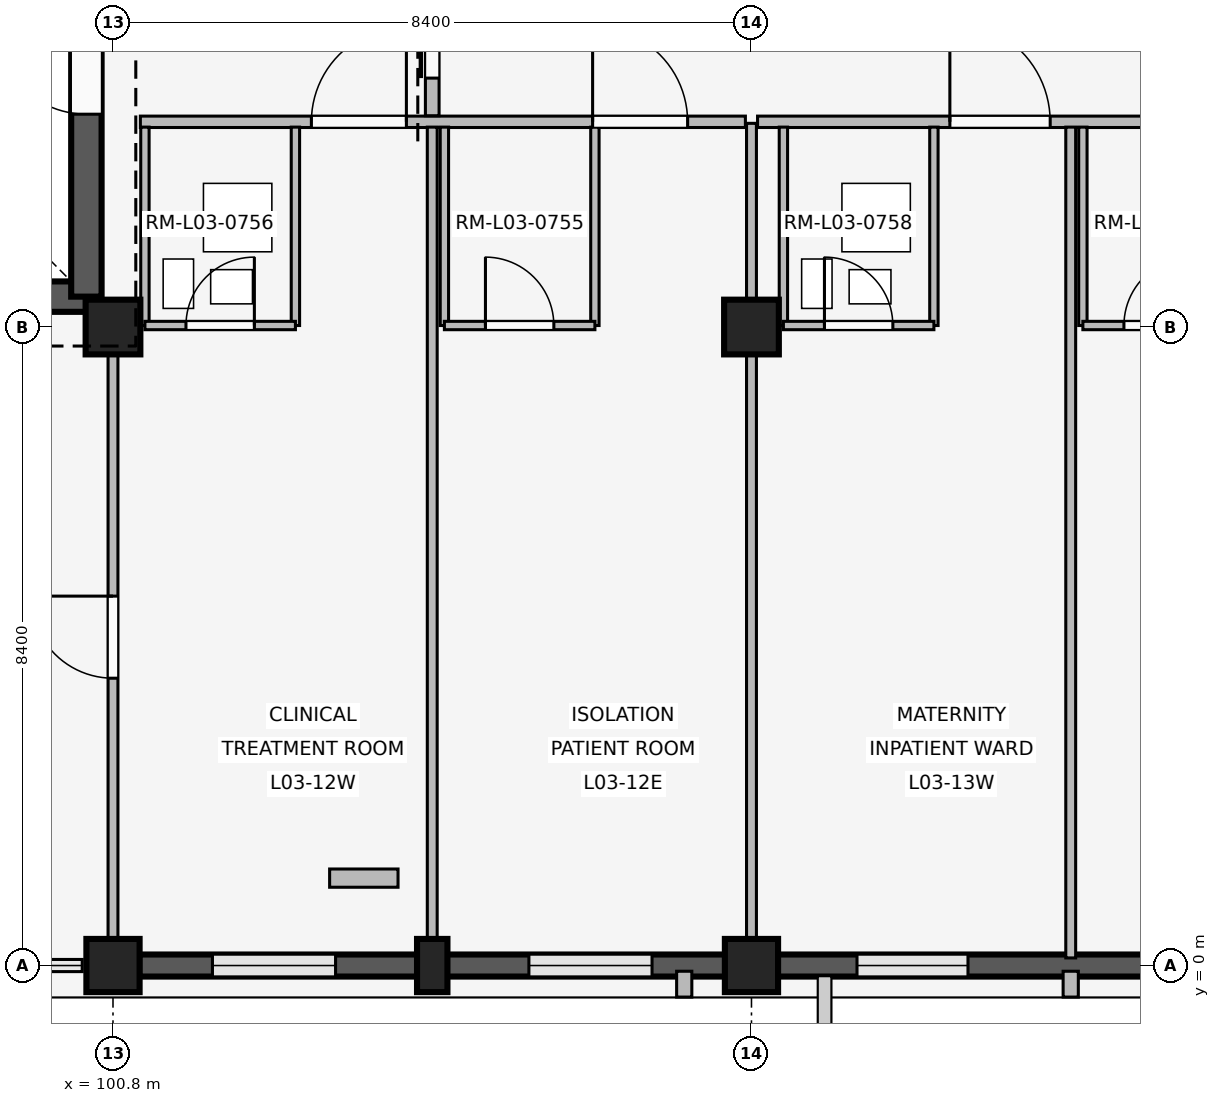
"""IFC4 building model, lengths in metres.
Left out: names, types, materials, properties, quantities, classifications, styles, units other than length and angle.
Written with IfcOpenShell. Run it as: python <this file> out.ifc"""

import sys

from ifc_helpers import new_model, si_unit, direction, frame, frame_2d, origin, origin_2d, place, context, subcontext, project, spatial, rectangle, extrude, element, fill, save


model = new_model("IFC4")
c1 = context("Model", 3, precision=1e-05, world=origin(), true_north=direction((0.0, 1.0)))
c2 = subcontext(c1, "Body", "Model", "MODEL_VIEW")
j1 = project(units=[si_unit("LENGTHUNIT", "METRE"), si_unit("PLANEANGLEUNIT", "RADIAN")], contexts=[c1])
p1 = place(None, origin())
s1 = spatial("IfcSite", under=j1, at=p1, CompositionType="ELEMENT")
p2 = place(p1, origin())
s2 = spatial("IfcBuilding", under=s1, at=p2, CompositionType="ELEMENT")
p3 = place(p2, frame((0.0, 0.0, 12.9)))
s3 = spatial("IfcBuildingStorey", under=s2, at=p3, CompositionType="ELEMENT", Elevation=12.9)
p4 = place(p3, frame((100.8, 0.0, 0.0), z_axis=(0.0, 0.0, 1.0), x_axis=(1.0, 0.0, 0.0)))
e1 = element("IfcColumn", 1, at=p4, inside=s3, PredefinedType="COLUMN", context=c2, shape_type="SweptSolid", body=[
    extrude(rectangle(XDim=0.7, YDim=0.7, at=origin_2d()), origin(), (0.0, 0.0, 1.0), 3.3),
])
p5 = place(p3, frame((100.8, 8.4, 0.0), z_axis=(0.0, 0.0, 1.0), x_axis=(1.0, 0.0, 0.0)))
e2 = element("IfcColumn", 2, at=p5, inside=s3, PredefinedType="COLUMN", context=c2, shape_type="SweptSolid", body=[
    extrude(rectangle(XDim=0.72, YDim=0.72, at=origin_2d()), origin(), (0.0, 0.0, 1.0), 3.3),
])
p6 = place(p3, frame((109.2, 0.0, 0.0), z_axis=(0.0, 0.0, 1.0), x_axis=(1.0, 0.0, 0.0)))
e3 = element("IfcColumn", 3, at=p6, inside=s3, PredefinedType="COLUMN", context=c2, shape_type="SweptSolid", body=[
    extrude(rectangle(XDim=0.7, YDim=0.7, at=origin_2d()), origin(), (0.0, 0.0, 1.0), 3.3),
])
p7 = place(p3, frame((109.2, 8.4, 0.0), z_axis=(0.0, 0.0, 1.0), x_axis=(1.0, 0.0, 0.0)))
e4 = element("IfcColumn", 4, at=p7, inside=s3, PredefinedType="COLUMN", context=c2, shape_type="SweptSolid", body=[
    extrude(rectangle(XDim=0.72, YDim=0.72, at=origin_2d()), origin(), (0.0, 0.0, 1.0), 3.3),
])
p8 = place(p3, frame((105.0, 0.0, 0.0), z_axis=(0.0, 0.0, 1.0), x_axis=(1.0, 0.0, 0.0)))
e5 = element("IfcColumn", 5, at=p8, inside=s3, PredefinedType="PILASTER", context=c2, shape_type="SweptSolid", body=[
    extrude(rectangle(XDim=0.4, YDim=0.7, at=origin_2d()), origin(), (0.0, 0.0, 1.0), 3.3),
])
p9 = place(p3, frame((108.855, 0.0, 0.0), z_axis=(0.0, 0.0, 1.0), x_axis=(-1.0, 0.0, 0.0)))
e6 = element("IfcWall", 6, at=p9, inside=s3, PredefinedType="SOLIDWALL", context=c2, shape_type="SweptSolid", body=[
    extrude(rectangle(XDim=7.71, YDim=0.29, at=frame_2d((3.855, 0.0))), origin(), (0.0, 0.0, 1.0), 2.44),
])
p10 = place(p9, frame((0.963, 0.0, 0.85)))
e7 = element("IfcOpeningElement", 7, at=p10, cuts=e6, PredefinedType="OPENING", context=c2, shape_type="SweptSolid", body=[
    extrude(rectangle(XDim=1.62, YDim=0.95, at=frame_2d((0.81, 0.475))), frame((0.0, 0.155, 0.0), z_axis=(0.0, -1.0, 0.0), x_axis=(1.0, 0.0, 0.0)), (0.0, 0.0, 1.0), 0.31),
])
p11 = place(p9, frame((5.127, 0.0, 0.85)))
e8 = element("IfcOpeningElement", 8, at=p11, cuts=e6, PredefinedType="OPENING", context=c2, shape_type="SweptSolid", body=[
    extrude(rectangle(XDim=1.62, YDim=0.95, at=frame_2d((0.81, 0.475))), frame((0.0, 0.155, 0.0), z_axis=(0.0, -1.0, 0.0), x_axis=(1.0, 0.0, 0.0)), (0.0, 0.0, 1.0), 0.31),
])
p12 = place(p3, frame((108.315, -0.075, 0.0), z_axis=(0.0, 0.0, 1.0), x_axis=(0.0, -1.0, 0.0)))
e9 = element("IfcWall", 9, at=p12, inside=s3, PredefinedType="ELEMENTEDWALL", context=c2, shape_type="SweptSolid", body=[
    extrude(rectangle(XDim=0.34, YDim=0.2, at=frame_2d((0.17, 0.0))), origin(), (0.0, 0.0, 1.0), 2.42),
])
p13 = place(p3, frame((117.255, 0.0, 0.0), z_axis=(0.0, 0.0, 1.0), x_axis=(-1.0, 0.0, 0.0)))
e10 = element("IfcWall", 10, at=p13, inside=s3, PredefinedType="SOLIDWALL", context=c2, shape_type="SweptSolid", body=[
    extrude(rectangle(XDim=7.71, YDim=0.29, at=frame_2d((3.855, 0.0))), origin(), (0.0, 0.0, 1.0), 2.44),
])
p14 = place(p13, frame((1.043, 0.0, 0.85)))
e11 = element("IfcOpeningElement", 11, at=p14, cuts=e10, PredefinedType="OPENING", context=c2, shape_type="SweptSolid", body=[
    extrude(rectangle(XDim=1.46, YDim=0.85, at=frame_2d((0.73, 0.425))), frame((0.0, 0.155, 0.0), z_axis=(0.0, -1.0, 0.0), x_axis=(1.0, 0.0, 0.0)), (0.0, 0.0, 1.0), 0.31),
])
p15 = place(p13, frame((5.207, 0.0, 0.85)))
e12 = element("IfcOpeningElement", 12, at=p15, cuts=e10, PredefinedType="OPENING", context=c2, shape_type="SweptSolid", body=[
    extrude(rectangle(XDim=1.46, YDim=0.85, at=frame_2d((0.73, 0.425))), frame((0.0, 0.155, 0.0), z_axis=(0.0, -1.0, 0.0), x_axis=(1.0, 0.0, 0.0)), (0.0, 0.0, 1.0), 0.31),
])
p16 = place(p3, frame((113.4, -0.075, 0.0), z_axis=(0.0, 0.0, 1.0), x_axis=(0.0, -1.0, 0.0)))
e13 = element("IfcWall", 13, at=p16, inside=s3, PredefinedType="ELEMENTEDWALL", context=c2, shape_type="SweptSolid", body=[
    extrude(rectangle(XDim=0.34, YDim=0.2, at=frame_2d((0.17, 0.0))), origin(), (0.0, 0.0, 1.0), 2.42),
])
p17 = place(p3, frame((92.95, 8.8, 0.0), z_axis=(0.0, 0.0, 1.0), x_axis=(1.0, 0.0, 0.0)))
e14 = element("IfcWall", 14, at=p17, inside=s3, PredefinedType="SHEAR", context=c2, shape_type="SweptSolid", body=[
    extrude(rectangle(XDim=7.5, YDim=0.4, at=frame_2d((3.75, 0.0))), origin(), (0.0, 0.0, 1.0), 3.02),
])
p18 = place(p17, frame((4.85, 0.0, 0.0)))
e15 = element("IfcOpeningElement", 15, at=p18, cuts=e14, PredefinedType="OPENING", context=c2, shape_type="SweptSolid", body=[
    extrude(rectangle(XDim=1.2, YDim=2.2, at=frame_2d((0.6, 1.1))), frame((0.0, 0.21, 0.0), z_axis=(0.0, -1.0, 0.0), x_axis=(1.0, 0.0, 0.0)), (0.0, 0.0, 1.0), 0.42),
])
p19 = place(p3, frame((100.45, 8.8, 0.0), z_axis=(0.0, 0.0, 1.0), x_axis=(0.0, 1.0, 0.0)))
e16 = element("IfcWall", 16, at=p19, inside=s3, PredefinedType="SHEAR", context=c2, shape_type="SweptSolid", body=[
    extrude(rectangle(XDim=7.55, YDim=0.4, at=frame_2d((3.775, 0.0))), origin(), (0.0, 0.0, 1.0), 3.02),
])
p20 = place(p19, frame((2.4, 0.0, 0.0)))
e17 = element("IfcOpeningElement", 17, at=p20, cuts=e16, PredefinedType="OPENING", context=c2, shape_type="SweptSolid", body=[
    extrude(rectangle(XDim=1.2, YDim=2.2, at=frame_2d((0.6, 1.1))), frame((0.0, 0.21, 0.0), z_axis=(0.0, -1.0, 0.0), x_axis=(1.0, 0.0, 0.0)), (0.0, 0.0, 1.0), 0.42),
])
p21 = place(p3, frame((100.8, 0.14, 0.0), z_axis=(0.0, 0.0, 1.0), x_axis=(0.0, 1.0, 0.0)))
e18 = element("IfcWall", 18, at=p21, inside=s3, PredefinedType="PARTITIONING", context=c2, shape_type="SweptSolid", body=[
    extrude(rectangle(XDim=8.21, YDim=0.13, at=frame_2d((4.105, 0.0))), origin(), (0.0, 0.0, 1.0), 2.42),
])
p22 = place(p21, frame((3.64, 0.0, 0.0)))
e19 = element("IfcOpeningElement", 19, at=p22, cuts=e18, PredefinedType="OPENING", context=c2, shape_type="SweptSolid", body=[
    extrude(rectangle(XDim=1.08, YDim=2.15, at=frame_2d((0.54, 1.075))), frame((0.0, 0.075, 0.0), z_axis=(0.0, -1.0, 0.0), x_axis=(1.0, 0.0, 0.0)), (0.0, 0.0, 1.0), 0.15),
])
p23 = place(p3, frame((101.16, 11.1, 0.0), z_axis=(0.0, 0.0, 1.0), x_axis=(1.0, 0.0, 0.0)))
e20 = element("IfcWall", 20, at=p23, inside=s3, PredefinedType="PARTITIONING", context=c2, shape_type="SweptSolid", body=[
    extrude(rectangle(XDim=7.96, YDim=0.15, at=frame_2d((3.98, 0.0))), origin(), (0.0, 0.0, 1.0), 2.42),
])
p24 = place(p23, frame((2.25, 0.0, 0.0)))
e21 = element("IfcOpeningElement", 21, at=p24, cuts=e20, PredefinedType="OPENING", context=c2, shape_type="SweptSolid", body=[
    extrude(rectangle(XDim=1.25, YDim=2.2, at=frame_2d((0.625, 1.1))), frame((0.0, 0.085, 0.0), z_axis=(0.0, -1.0, 0.0), x_axis=(1.0, 0.0, 0.0)), (0.0, 0.0, 1.0), 0.17),
])
p25 = place(p23, frame((5.95, 0.0, 0.0)))
e22 = element("IfcOpeningElement", 22, at=p25, cuts=e20, PredefinedType="OPENING", context=c2, shape_type="SweptSolid", body=[
    extrude(rectangle(XDim=1.25, YDim=2.2, at=frame_2d((0.625, 1.1))), frame((0.0, 0.085, 0.0), z_axis=(0.0, -1.0, 0.0), x_axis=(1.0, 0.0, 0.0)), (0.0, 0.0, 1.0), 0.17),
])
p26 = place(p3, frame((105.0, 0.1, 0.0), z_axis=(0.0, 0.0, 1.0), x_axis=(0.0, 1.0, 0.0)))
e23 = element("IfcWall", 23, at=p26, inside=s3, PredefinedType="PARTITIONING", context=c2, shape_type="SweptSolid", body=[
    extrude(rectangle(XDim=10.93, YDim=0.13, at=frame_2d((5.465, 0.0))), origin(), (0.0, 0.0, 1.0), 2.42),
])
for number, where, z_axis, x_axis in (
    (24, (101.22, 8.42, 0.0), (0.0, 0.0, 1.0), (0.0, 1.0, 0.0)),
    (25, (103.2, 8.42, 0.0), (0.0, 0.0, 1.0), (0.0, 1.0, 0.0)),
):
    element("IfcWall", number, at=place(p3, frame(where, z_axis=z_axis, x_axis=x_axis)), inside=s3, PredefinedType="PARTITIONING", context=c2, shape_type="SweptSolid", body=[
        extrude(rectangle(XDim=2.61, YDim=0.11, at=frame_2d((1.305, 0.0))), origin(), (0.0, 0.0, 1.0), 2.42),
    ])
p27 = place(p3, frame((101.22, 8.42, 0.0), z_axis=(0.0, 0.0, 1.0), x_axis=(1.0, 0.0, 0.0)))
e26 = element("IfcWall", 26, at=p27, inside=s3, PredefinedType="PARTITIONING", context=c2, shape_type="SweptSolid", body=[
    extrude(rectangle(XDim=1.98, YDim=0.11, at=frame_2d((0.99, 0.0))), origin(), (0.0, 0.0, 1.0), 2.42),
])
p28 = place(p27, frame((0.54, 0.0, 0.0)))
e27 = element("IfcOpeningElement", 27, at=p28, cuts=e26, PredefinedType="OPENING", context=c2, shape_type="SweptSolid", body=[
    extrude(rectangle(XDim=0.9, YDim=2.1, at=frame_2d((0.45, 1.05))), frame((0.0, 0.065, 0.0), z_axis=(0.0, -1.0, 0.0), x_axis=(1.0, 0.0, 0.0)), (0.0, 0.0, 1.0), 0.13),
])
for number, where, z_axis, x_axis in (
    (28, (105.16, 8.42, 0.0), (0.0, 0.0, 1.0), (0.0, 1.0, 0.0)),
    (29, (107.14, 8.42, 0.0), (0.0, 0.0, 1.0), (0.0, 1.0, 0.0)),
):
    element("IfcWall", number, at=place(p3, frame(where, z_axis=z_axis, x_axis=x_axis)), inside=s3, PredefinedType="PARTITIONING", context=c2, shape_type="SweptSolid", body=[
        extrude(rectangle(XDim=2.61, YDim=0.11, at=frame_2d((1.305, 0.0))), origin(), (0.0, 0.0, 1.0), 2.42),
    ])
p29 = place(p3, frame((105.16, 8.42, 0.0), z_axis=(0.0, 0.0, 1.0), x_axis=(1.0, 0.0, 0.0)))
e30 = element("IfcWall", 30, at=p29, inside=s3, PredefinedType="PARTITIONING", context=c2, shape_type="SweptSolid", body=[
    extrude(rectangle(XDim=1.98, YDim=0.11, at=frame_2d((0.99, 0.0))), origin(), (0.0, 0.0, 1.0), 2.42),
])
p30 = place(p29, frame((0.54, 0.0, 0.0)))
e31 = element("IfcOpeningElement", 31, at=p30, cuts=e30, PredefinedType="OPENING", context=c2, shape_type="SweptSolid", body=[
    extrude(rectangle(XDim=0.9, YDim=2.1, at=frame_2d((0.45, 1.05))), frame((0.0, 0.065, 0.0), z_axis=(0.0, -1.0, 0.0), x_axis=(1.0, 0.0, 0.0)), (0.0, 0.0, 1.0), 0.13),
])
p31 = place(p3, frame((103.65, 1.15, 0.0), z_axis=(0.0, 0.0, 1.0), x_axis=(1.0, 0.0, 0.0)))
e32 = element("IfcWall", 32, at=p31, inside=s3, PredefinedType="PLUMBINGWALL", context=c2, shape_type="SweptSolid", body=[
    extrude(rectangle(XDim=0.9, YDim=0.24, at=frame_2d((0.45, 0.0))), origin(), (0.0, 0.0, 1.0), 2.42),
])
p32 = place(p3, frame((105.0, 11.18, 0.0), z_axis=(0.0, 0.0, 1.0), x_axis=(0.0, 1.0, 0.0)))
e33 = element("IfcWall", 33, at=p32, inside=s3, PredefinedType="PARTITIONING", context=c2, shape_type="SweptSolid", body=[
    extrude(rectangle(XDim=2.84, YDim=0.18, at=frame_2d((1.42, 0.0))), origin(), (0.0, 0.0, 1.0), 2.42),
])
p33 = place(p32, frame((0.495, 0.0, 0.0)))
e34 = element("IfcOpeningElement", 34, at=p33, cuts=e33, PredefinedType="OPENING", context=c2, shape_type="SweptSolid", body=[
    extrude(rectangle(XDim=1.85, YDim=2.3, at=frame_2d((0.925, 1.15))), frame((0.0, 0.1, 0.0), z_axis=(0.0, -1.0, 0.0), x_axis=(1.0, 0.0, 0.0)), (0.0, 0.0, 1.0), 0.2),
])
p34 = place(p3, frame((109.2, 0.14, 0.0), z_axis=(0.0, 0.0, 1.0), x_axis=(0.0, 1.0, 0.0)))
e35 = element("IfcWall", 35, at=p34, inside=s3, PredefinedType="PARTITIONING", context=c2, shape_type="SweptSolid", body=[
    extrude(rectangle(XDim=10.94, YDim=0.13, at=frame_2d((5.47, 0.0))), origin(), (0.0, 0.0, 1.0), 2.42),
])
p35 = place(p3, frame((109.28, 11.1, 0.0), z_axis=(0.0, 0.0, 1.0), x_axis=(1.0, 0.0, 0.0)))
e36 = element("IfcWall", 36, at=p35, inside=s3, PredefinedType="PARTITIONING", context=c2, shape_type="SweptSolid", body=[
    extrude(rectangle(XDim=8.24, YDim=0.15, at=frame_2d((4.12, 0.0))), origin(), (0.0, 0.0, 1.0), 2.42),
])
p36 = place(p35, frame((2.53, 0.0, 0.0)))
e37 = element("IfcOpeningElement", 37, at=p36, cuts=e36, PredefinedType="OPENING", context=c2, shape_type="SweptSolid", body=[
    extrude(rectangle(XDim=1.32, YDim=2.25, at=frame_2d((0.66, 1.125))), frame((0.0, 0.085, 0.0), z_axis=(0.0, -1.0, 0.0), x_axis=(1.0, 0.0, 0.0)), (0.0, 0.0, 1.0), 0.17),
])
p37 = place(p35, frame((6.23, 0.0, 0.0)))
e38 = element("IfcOpeningElement", 38, at=p37, cuts=e36, PredefinedType="OPENING", context=c2, shape_type="SweptSolid", body=[
    extrude(rectangle(XDim=1.32, YDim=2.25, at=frame_2d((0.66, 1.125))), frame((0.0, 0.085, 0.0), z_axis=(0.0, -1.0, 0.0), x_axis=(1.0, 0.0, 0.0)), (0.0, 0.0, 1.0), 0.17),
])
p38 = place(p3, frame((113.4, 0.1, 0.0), z_axis=(0.0, 0.0, 1.0), x_axis=(0.0, 1.0, 0.0)))
e39 = element("IfcWall", 39, at=p38, inside=s3, PredefinedType="PARTITIONING", context=c2, shape_type="SweptSolid", body=[
    extrude(rectangle(XDim=10.93, YDim=0.13, at=frame_2d((5.465, 0.0))), origin(), (0.0, 0.0, 1.0), 2.42),
])
for number, where, z_axis, x_axis in (
    (40, (109.62, 8.42, 0.0), (0.0, 0.0, 1.0), (0.0, 1.0, 0.0)),
    (41, (111.6, 8.42, 0.0), (0.0, 0.0, 1.0), (0.0, 1.0, 0.0)),
):
    element("IfcWall", number, at=place(p3, frame(where, z_axis=z_axis, x_axis=x_axis)), inside=s3, PredefinedType="PARTITIONING", context=c2, shape_type="SweptSolid", body=[
        extrude(rectangle(XDim=2.61, YDim=0.11, at=frame_2d((1.305, 0.0))), origin(), (0.0, 0.0, 1.0), 2.42),
    ])
p39 = place(p3, frame((109.62, 8.42, 0.0), z_axis=(0.0, 0.0, 1.0), x_axis=(1.0, 0.0, 0.0)))
e42 = element("IfcWall", 42, at=p39, inside=s3, PredefinedType="PARTITIONING", context=c2, shape_type="SweptSolid", body=[
    extrude(rectangle(XDim=1.98, YDim=0.11, at=frame_2d((0.99, 0.0))), origin(), (0.0, 0.0, 1.0), 2.42),
])
p40 = place(p39, frame((0.54, 0.0, 0.0)))
e43 = element("IfcOpeningElement", 43, at=p40, cuts=e42, PredefinedType="OPENING", context=c2, shape_type="SweptSolid", body=[
    extrude(rectangle(XDim=0.9, YDim=2.1, at=frame_2d((0.45, 1.05))), frame((0.0, 0.065, 0.0), z_axis=(0.0, -1.0, 0.0), x_axis=(1.0, 0.0, 0.0)), (0.0, 0.0, 1.0), 0.13),
])
p41 = place(p3, frame((113.56, 8.42, 0.0), z_axis=(0.0, 0.0, 1.0), x_axis=(0.0, 1.0, 0.0)))
e44 = element("IfcWall", 44, at=p41, inside=s3, PredefinedType="PARTITIONING", context=c2, shape_type="SweptSolid", body=[
    extrude(rectangle(XDim=2.61, YDim=0.11, at=frame_2d((1.305, 0.0))), origin(), (0.0, 0.0, 1.0), 2.42),
])
p42 = place(p3, frame((113.56, 8.42, 0.0), z_axis=(0.0, 0.0, 1.0), x_axis=(1.0, 0.0, 0.0)))
e45 = element("IfcWall", 45, at=p42, inside=s3, PredefinedType="PARTITIONING", context=c2, shape_type="SweptSolid", body=[
    extrude(rectangle(XDim=1.98, YDim=0.11, at=frame_2d((0.99, 0.0))), origin(), (0.0, 0.0, 1.0), 2.42),
])
p43 = place(p42, frame((0.54, 0.0, 0.0)))
e46 = element("IfcOpeningElement", 46, at=p43, cuts=e45, PredefinedType="OPENING", context=c2, shape_type="SweptSolid", body=[
    extrude(rectangle(XDim=0.9, YDim=2.1, at=frame_2d((0.45, 1.05))), frame((0.0, 0.065, 0.0), z_axis=(0.0, -1.0, 0.0), x_axis=(1.0, 0.0, 0.0)), (0.0, 0.0, 1.0), 0.13),
])
p44 = place(p10, origin())
e47 = element("IfcWindow", 47, at=p44, inside=s3, PartitioningType="SINGLE_PANEL", PredefinedType="WINDOW", context=c2, shape_type="SweptSolid", body=[
    extrude(rectangle(XDim=1.62, YDim=0.95, at=frame_2d((0.81, 0.475))), frame((0.0, 0.03, 0.0), z_axis=(0.0, -1.0, 0.0), x_axis=(1.0, 0.0, 0.0)), (0.0, 0.0, 1.0), 0.06),
])
fill(e7, e47)
p45 = place(p11, origin())
e48 = element("IfcWindow", 48, at=p45, inside=s3, PartitioningType="SINGLE_PANEL", PredefinedType="WINDOW", context=c2, shape_type="SweptSolid", body=[
    extrude(rectangle(XDim=1.62, YDim=0.95, at=frame_2d((0.81, 0.475))), frame((0.0, 0.03, 0.0), z_axis=(0.0, -1.0, 0.0), x_axis=(1.0, 0.0, 0.0)), (0.0, 0.0, 1.0), 0.06),
])
fill(e8, e48)
p46 = place(p15, origin())
e49 = element("IfcWindow", 49, at=p46, inside=s3, PartitioningType="SINGLE_PANEL", PredefinedType="WINDOW", context=c2, shape_type="SweptSolid", body=[
    extrude(rectangle(XDim=1.46, YDim=0.85, at=frame_2d((0.73, 0.425))), frame((0.0, 0.03, 0.0), z_axis=(0.0, -1.0, 0.0), x_axis=(1.0, 0.0, 0.0)), (0.0, 0.0, 1.0), 0.06),
])
fill(e12, e49)
p47 = place(p20, origin())
e50 = element("IfcDoor", 50, at=p47, inside=s3, OperationType="SINGLE_SWING_RIGHT", PredefinedType="DOOR", context=c2, shape_type="SweptSolid", body=[
    extrude(rectangle(XDim=1.2, YDim=2.2, at=frame_2d((0.6, 1.1))), frame((0.0, 0.025, 0.0), z_axis=(0.0, -1.0, 0.0), x_axis=(1.0, 0.0, 0.0)), (0.0, 0.0, 1.0), 0.05),
])
fill(e17, e50)
p48 = place(p22, origin())
e51 = element("IfcDoor", 51, at=p48, inside=s3, OperationType="SINGLE_SWING_RIGHT", PredefinedType="DOOR", context=c2, shape_type="SweptSolid", body=[
    extrude(rectangle(XDim=1.08, YDim=2.15, at=frame_2d((0.54, 1.075))), frame((0.0, 0.025, 0.0), z_axis=(0.0, -1.0, 0.0), x_axis=(1.0, 0.0, 0.0)), (0.0, 0.0, 1.0), 0.05),
])
fill(e19, e51)
p49 = place(p24, origin())
e52 = element("IfcDoor", 52, at=p49, inside=s3, OperationType="SINGLE_SWING_RIGHT", PredefinedType="DOOR", context=c2, shape_type="SweptSolid", body=[
    extrude(rectangle(XDim=1.25, YDim=2.2, at=frame_2d((0.625, 1.1))), frame((0.0, 0.025, 0.0), z_axis=(0.0, -1.0, 0.0), x_axis=(1.0, 0.0, 0.0)), (0.0, 0.0, 1.0), 0.05),
])
fill(e21, e52)
p50 = place(p25, origin())
e53 = element("IfcDoor", 53, at=p50, inside=s3, OperationType="SINGLE_SWING_LEFT", PredefinedType="DOOR", context=c2, shape_type="SweptSolid", body=[
    extrude(rectangle(XDim=1.25, YDim=2.2, at=frame_2d((0.625, 1.1))), frame((0.0, 0.025, 0.0), z_axis=(0.0, -1.0, 0.0), x_axis=(1.0, 0.0, 0.0)), (0.0, 0.0, 1.0), 0.05),
])
fill(e22, e53)
p51 = place(p28, origin())
e54 = element("IfcDoor", 54, at=p51, inside=s3, OperationType="SINGLE_SWING_RIGHT", PredefinedType="DOOR", context=c2, shape_type="SweptSolid", body=[
    extrude(rectangle(XDim=0.9, YDim=2.1, at=frame_2d((0.45, 1.05))), frame((0.0, 0.025, 0.0), z_axis=(0.0, -1.0, 0.0), x_axis=(1.0, 0.0, 0.0)), (0.0, 0.0, 1.0), 0.05),
])
fill(e27, e54)
p52 = place(p30, origin())
e55 = element("IfcDoor", 55, at=p52, inside=s3, OperationType="SINGLE_SWING_LEFT", PredefinedType="DOOR", context=c2, shape_type="SweptSolid", body=[
    extrude(rectangle(XDim=0.9, YDim=2.1, at=frame_2d((0.45, 1.05))), frame((0.0, 0.025, 0.0), z_axis=(0.0, -1.0, 0.0), x_axis=(1.0, 0.0, 0.0)), (0.0, 0.0, 1.0), 0.05),
])
fill(e31, e55)
p53 = place(p33, origin())
e56 = element("IfcDoor", 56, at=p53, inside=s3, OperationType="SLIDING_TO_LEFT", PredefinedType="DOOR", context=c2, shape_type="SweptSolid", body=[
    extrude(rectangle(XDim=1.85, YDim=2.3, at=frame_2d((0.925, 1.15))), frame((0.0, 0.025, 0.0), z_axis=(0.0, -1.0, 0.0), x_axis=(1.0, 0.0, 0.0)), (0.0, 0.0, 1.0), 0.05),
])
fill(e34, e56)
p54 = place(p36, origin())
e57 = element("IfcDoor", 57, at=p54, inside=s3, OperationType="SINGLE_SWING_LEFT", PredefinedType="DOOR", context=c2, shape_type="SweptSolid", body=[
    extrude(rectangle(XDim=1.32, YDim=2.25, at=frame_2d((0.66, 1.125))), frame((0.0, 0.025, 0.0), z_axis=(0.0, -1.0, 0.0), x_axis=(1.0, 0.0, 0.0)), (0.0, 0.0, 1.0), 0.05),
])
fill(e37, e57)
p55 = place(p40, origin())
e58 = element("IfcDoor", 58, at=p55, inside=s3, OperationType="SINGLE_SWING_LEFT", PredefinedType="DOOR", context=c2, shape_type="SweptSolid", body=[
    extrude(rectangle(XDim=0.9, YDim=2.1, at=frame_2d((0.45, 1.05))), frame((0.0, 0.025, 0.0), z_axis=(0.0, -1.0, 0.0), x_axis=(1.0, 0.0, 0.0)), (0.0, 0.0, 1.0), 0.05),
])
fill(e43, e58)
p56 = place(p43, origin())
e59 = element("IfcDoor", 59, at=p56, inside=s3, OperationType="SINGLE_SWING_RIGHT", PredefinedType="DOOR", context=c2, shape_type="SweptSolid", body=[
    extrude(rectangle(XDim=0.9, YDim=2.1, at=frame_2d((0.45, 1.05))), frame((0.0, 0.025, 0.0), z_axis=(0.0, -1.0, 0.0), x_axis=(1.0, 0.0, 0.0)), (0.0, 0.0, 1.0), 0.05),
])
fill(e46, e59)
save(model, sys.argv[1])
